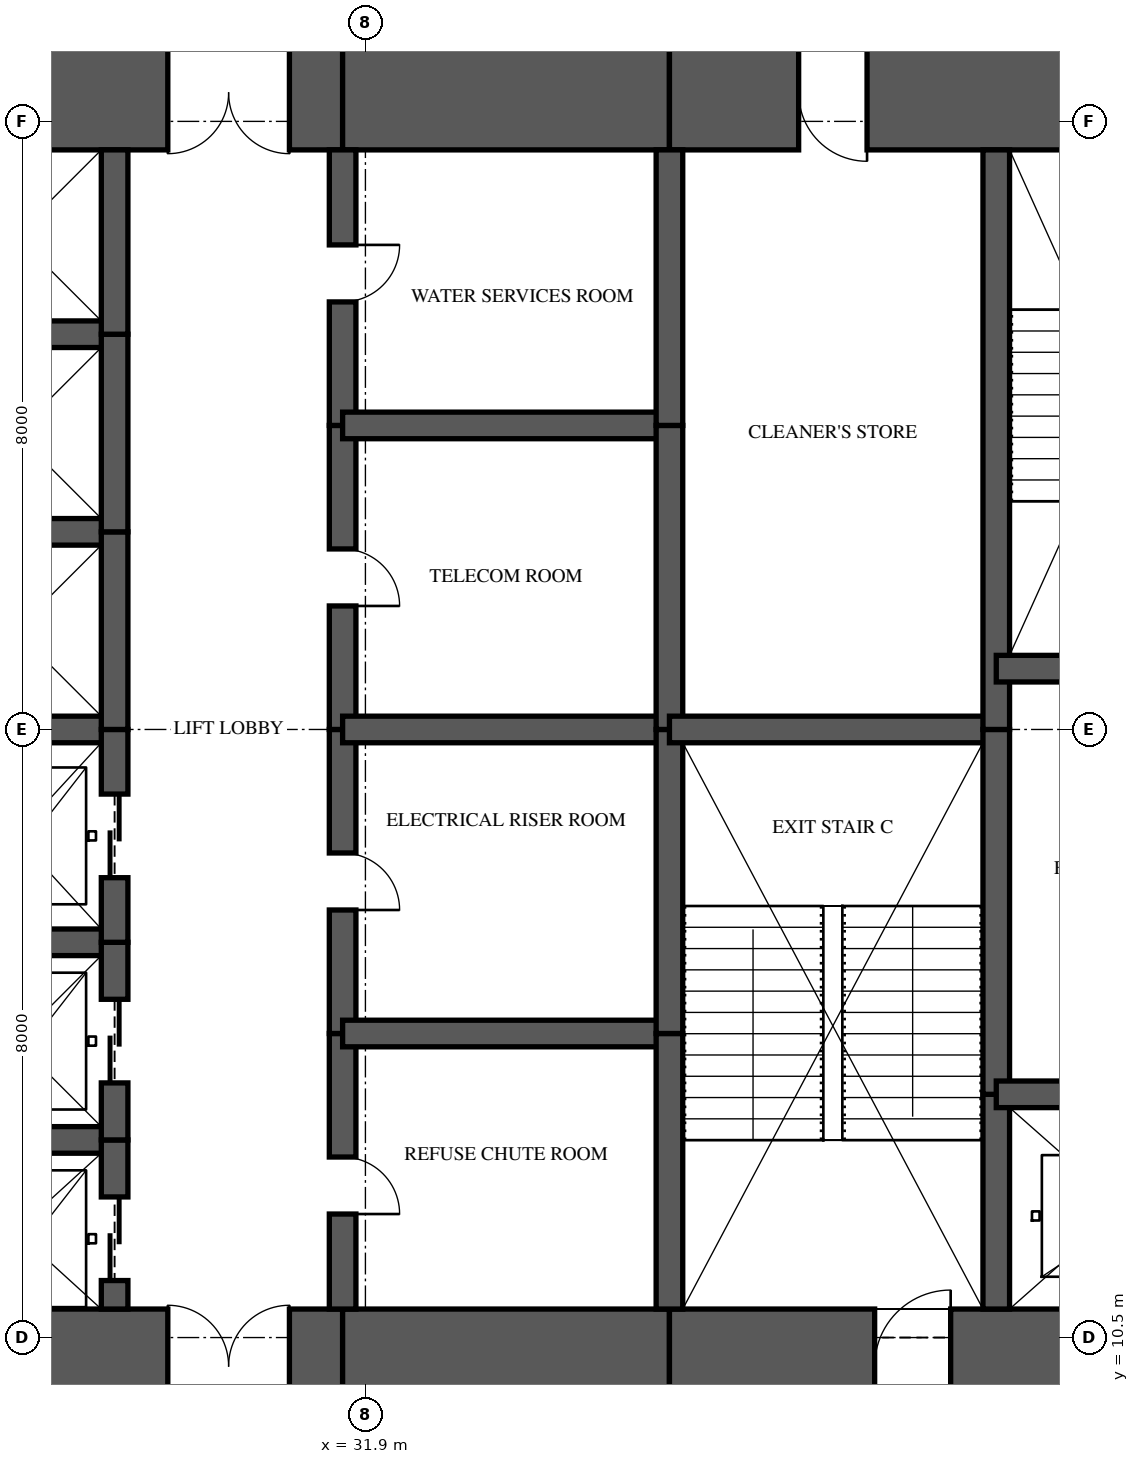
"""IFC4 building model, lengths in metres.
Left out: names, types, materials, properties, quantities, classifications, styles, units other than length and angle.
Written with IfcOpenShell. Run it as: python <this file> out.ifc"""

import sys

from ifc_helpers import new_model, si_unit, direction, frame, frame_2d, origin, place, context, subcontext, project, spatial, rectangle, extrude, element, fill, save


model = new_model("IFC4")
c1 = context("Model", 3, precision=1e-05, world=origin(), true_north=direction((0.0, 1.0)))
c2 = subcontext(c1, "Body", "Model", "MODEL_VIEW")
j1 = project(units=[si_unit("LENGTHUNIT", "METRE"), si_unit("PLANEANGLEUNIT", "RADIAN")], contexts=[c1])
p1 = place(None, origin())
s1 = spatial("IfcSite", under=j1, at=p1, CompositionType="ELEMENT")
p2 = place(p1, origin())
s2 = spatial("IfcBuilding", under=s1, at=p2, CompositionType="ELEMENT")
p3 = place(p2, frame((0.0, 0.0, 84.75)))
s3 = spatial("IfcBuildingStorey", under=s2, at=p3, CompositionType="ELEMENT", Elevation=84.75)
p4 = place(p3, frame((26.0, 10.125, 0.0), z_axis=(0.0, 0.0, 1.0), x_axis=(1.0, 0.0, 0.0)))
e1 = element("IfcWall", 1, at=p4, inside=s3, PredefinedType="SHEAR", context=c2, shape_type="SweptSolid", body=[
    extrude(rectangle(XDim=5.6, YDim=1.5, at=frame_2d((2.8, 0.0))), origin(), (0.0, 0.0, 1.0), 3.35),
])
p5 = place(p4, frame((3.3, 0.0, 0.0)))
e2 = element("IfcOpeningElement", 2, at=p5, cuts=e1, PredefinedType="OPENING", context=c2, shape_type="SweptSolid", body=[
    extrude(rectangle(XDim=1.6, YDim=2.1, at=frame_2d((0.8, 1.05))), frame((0.0, 0.76, 0.0), z_axis=(0.0, -1.0, 0.0), x_axis=(1.0, 0.0, 0.0)), (0.0, 0.0, 1.0), 1.52),
])
p6 = place(p3, frame((31.6, 10.125, 0.0), z_axis=(0.0, 0.0, 1.0), x_axis=(1.0, 0.0, 0.0)))
e3 = element("IfcWall", 3, at=p6, inside=s3, PredefinedType="SHEAR", context=c2, shape_type="SweptSolid", body=[
    extrude(rectangle(XDim=4.3, YDim=1.5, at=frame_2d((2.15, 0.0))), origin(), (0.0, 0.0, 1.0), 3.35),
])
p7 = place(p3, frame((35.9, 10.125, 0.0), z_axis=(0.0, 0.0, 1.0), x_axis=(1.0, 0.0, 0.0)))
e4 = element("IfcWall", 4, at=p7, inside=s3, PredefinedType="SHEAR", context=c2, shape_type="SweptSolid", body=[
    extrude(rectangle(XDim=8.325, YDim=1.5, at=frame_2d((4.163, 0.0))), origin(), (0.0, 0.0, 1.0), 3.35),
])
p8 = place(p7, frame((2.7, 0.0, 0.0)))
e5 = element("IfcOpeningElement", 5, at=p8, cuts=e4, PredefinedType="OPENING", context=c2, shape_type="SweptSolid", body=[
    extrude(rectangle(XDim=1.0, YDim=2.1, at=frame_2d((0.5, 1.05))), frame((0.0, 0.76, 0.0), z_axis=(0.0, -1.0, 0.0), x_axis=(1.0, 0.0, 0.0)), (0.0, 0.0, 1.0), 1.52),
])
p9 = place(p3, frame((44.225, 26.875, 0.0), z_axis=(0.0, 0.0, 1.0), x_axis=(-1.0, 0.0, 0.0)))
e6 = element("IfcWall", 6, at=p9, inside=s3, PredefinedType="SHEAR", context=c2, shape_type="SweptSolid", body=[
    extrude(rectangle(XDim=8.325, YDim=1.5, at=frame_2d((4.163, 0.0))), origin(), (0.0, 0.0, 1.0), 3.35),
])
p10 = place(p9, frame((5.725, 0.0, 0.0)))
e7 = element("IfcOpeningElement", 7, at=p10, cuts=e6, PredefinedType="OPENING", context=c2, shape_type="SweptSolid", body=[
    extrude(rectangle(XDim=0.9, YDim=2.1, at=frame_2d((0.45, 1.05))), frame((0.0, 0.76, 0.0), z_axis=(0.0, -1.0, 0.0), x_axis=(1.0, 0.0, 0.0)), (0.0, 0.0, 1.0), 1.52),
])
p11 = place(p3, frame((35.9, 26.875, 0.0), z_axis=(0.0, 0.0, 1.0), x_axis=(-1.0, 0.0, 0.0)))
e8 = element("IfcWall", 8, at=p11, inside=s3, PredefinedType="SHEAR", context=c2, shape_type="SweptSolid", body=[
    extrude(rectangle(XDim=4.3, YDim=1.5, at=frame_2d((2.15, 0.0))), origin(), (0.0, 0.0, 1.0), 3.35),
])
p12 = place(p3, frame((31.6, 26.875, 0.0), z_axis=(0.0, 0.0, 1.0), x_axis=(-1.0, 0.0, 0.0)))
e9 = element("IfcWall", 9, at=p12, inside=s3, PredefinedType="SHEAR", context=c2, shape_type="SweptSolid", body=[
    extrude(rectangle(XDim=5.6, YDim=1.5, at=frame_2d((2.8, 0.0))), origin(), (0.0, 0.0, 1.0), 3.35),
])
p13 = place(p12, frame((0.7, 0.0, 0.0)))
e10 = element("IfcOpeningElement", 10, at=p13, cuts=e9, PredefinedType="OPENING", context=c2, shape_type="SweptSolid", body=[
    extrude(rectangle(XDim=1.6, YDim=2.1, at=frame_2d((0.8, 1.05))), frame((0.0, 0.76, 0.0), z_axis=(0.0, -1.0, 0.0), x_axis=(1.0, 0.0, 0.0)), (0.0, 0.0, 1.0), 1.52),
])
p14 = place(p3, frame((28.6, 10.875, 0.0), z_axis=(0.0, 0.0, 1.0), x_axis=(0.0, 1.0, 0.0)))
e11 = element("IfcWall", 11, at=p14, inside=s3, PredefinedType="SHEAR", context=c2, shape_type="SweptSolid", body=[
    extrude(rectangle(XDim=2.225, YDim=0.35, at=frame_2d((1.113, 0.0))), origin(), (0.0, 0.0, 1.0), 3.35),
])
p15 = place(p14, frame((0.375, 0.0, 0.0)))
e12 = element("IfcOpeningElement", 12, at=p15, cuts=e11, PredefinedType="OPENING", context=c2, shape_type="SweptSolid", body=[
    extrude(rectangle(XDim=1.1, YDim=2.1, at=frame_2d((0.55, 1.05))), frame((0.0, 0.185, 0.0), z_axis=(0.0, -1.0, 0.0), x_axis=(1.0, 0.0, 0.0)), (0.0, 0.0, 1.0), 0.37),
])
p16 = place(p3, frame((28.6, 13.1, 0.0), z_axis=(0.0, 0.0, 1.0), x_axis=(0.0, 1.0, 0.0)))
e13 = element("IfcWall", 13, at=p16, inside=s3, PredefinedType="SHEAR", context=c2, shape_type="SweptSolid", body=[
    extrude(rectangle(XDim=2.6, YDim=0.35, at=frame_2d((1.3, 0.0))), origin(), (0.0, 0.0, 1.0), 3.35),
])
p17 = place(p16, frame((0.75, 0.0, 0.0)))
e14 = element("IfcOpeningElement", 14, at=p17, cuts=e13, PredefinedType="OPENING", context=c2, shape_type="SweptSolid", body=[
    extrude(rectangle(XDim=1.1, YDim=2.1, at=frame_2d((0.55, 1.05))), frame((0.0, 0.185, 0.0), z_axis=(0.0, -1.0, 0.0), x_axis=(1.0, 0.0, 0.0)), (0.0, 0.0, 1.0), 0.37),
])
p18 = place(p3, frame((28.6, 15.7, 0.0), z_axis=(0.0, 0.0, 1.0), x_axis=(0.0, 1.0, 0.0)))
e15 = element("IfcWall", 15, at=p18, inside=s3, PredefinedType="SHEAR", context=c2, shape_type="SweptSolid", body=[
    extrude(rectangle(XDim=2.8, YDim=0.35, at=frame_2d((1.4, 0.0))), origin(), (0.0, 0.0, 1.0), 3.35),
])
p19 = place(p18, frame((0.85, 0.0, 0.0)))
e16 = element("IfcOpeningElement", 16, at=p19, cuts=e15, PredefinedType="OPENING", context=c2, shape_type="SweptSolid", body=[
    extrude(rectangle(XDim=1.1, YDim=2.1, at=frame_2d((0.55, 1.05))), frame((0.0, 0.185, 0.0), z_axis=(0.0, -1.0, 0.0), x_axis=(1.0, 0.0, 0.0)), (0.0, 0.0, 1.0), 0.37),
])
p20 = place(p3, frame((28.6, 18.5, 0.0), z_axis=(0.0, 0.0, 1.0), x_axis=(0.0, 1.0, 0.0)))
e17 = element("IfcWall", 17, at=p20, inside=s3, PredefinedType="SHEAR", context=c2, shape_type="SweptSolid", body=[
    extrude(rectangle(XDim=2.6, YDim=0.35, at=frame_2d((1.3, 0.0))), origin(), (0.0, 0.0, 1.0), 3.35),
])
p21 = place(p3, frame((28.6, 21.1, 0.0), z_axis=(0.0, 0.0, 1.0), x_axis=(0.0, 1.0, 0.0)))
e18 = element("IfcWall", 18, at=p21, inside=s3, PredefinedType="SHEAR", context=c2, shape_type="SweptSolid", body=[
    extrude(rectangle(XDim=2.6, YDim=0.35, at=frame_2d((1.3, 0.0))), origin(), (0.0, 0.0, 1.0), 3.35),
])
p22 = place(p3, frame((28.6, 23.7, 0.0), z_axis=(0.0, 0.0, 1.0), x_axis=(0.0, 1.0, 0.0)))
e19 = element("IfcWall", 19, at=p22, inside=s3, PredefinedType="SHEAR", context=c2, shape_type="SweptSolid", body=[
    extrude(rectangle(XDim=2.425, YDim=0.35, at=frame_2d((1.212, 0.0))), origin(), (0.0, 0.0, 1.0), 3.35),
])
p23 = place(p3, frame((31.6, 10.875, 0.0), z_axis=(0.0, 0.0, 1.0), x_axis=(0.0, 1.0, 0.0)))
e20 = element("IfcWall", 20, at=p23, inside=s3, PredefinedType="SHEAR", context=c2, shape_type="SweptSolid", body=[
    extrude(rectangle(XDim=3.625, YDim=0.35, at=frame_2d((1.812, 0.0))), origin(), (0.0, 0.0, 1.0), 3.35),
])
p24 = place(p23, frame((1.25, 0.0, 0.0)))
e21 = element("IfcOpeningElement", 21, at=p24, cuts=e20, PredefinedType="OPENING", context=c2, shape_type="SweptSolid", body=[
    extrude(rectangle(XDim=0.75, YDim=2.1, at=frame_2d((0.375, 1.05))), frame((0.0, 0.185, 0.0), z_axis=(0.0, -1.0, 0.0), x_axis=(1.0, 0.0, 0.0)), (0.0, 0.0, 1.0), 0.37),
])
p25 = place(p3, frame((31.6, 14.5, 0.0), z_axis=(0.0, 0.0, 1.0), x_axis=(0.0, 1.0, 0.0)))
e22 = element("IfcWall", 22, at=p25, inside=s3, PredefinedType="SHEAR", context=c2, shape_type="SweptSolid", body=[
    extrude(rectangle(XDim=4.0, YDim=0.35, at=frame_2d((2.0, 0.0))), origin(), (0.0, 0.0, 1.0), 3.35),
])
p26 = place(p25, frame((1.625, 0.0, 0.0)))
e23 = element("IfcOpeningElement", 23, at=p26, cuts=e22, PredefinedType="OPENING", context=c2, shape_type="SweptSolid", body=[
    extrude(rectangle(XDim=0.75, YDim=2.1, at=frame_2d((0.375, 1.05))), frame((0.0, 0.185, 0.0), z_axis=(0.0, -1.0, 0.0), x_axis=(1.0, 0.0, 0.0)), (0.0, 0.0, 1.0), 0.37),
])
p27 = place(p3, frame((31.6, 18.5, 0.0), z_axis=(0.0, 0.0, 1.0), x_axis=(0.0, 1.0, 0.0)))
e24 = element("IfcWall", 24, at=p27, inside=s3, PredefinedType="SHEAR", context=c2, shape_type="SweptSolid", body=[
    extrude(rectangle(XDim=4.0, YDim=0.35, at=frame_2d((2.0, 0.0))), origin(), (0.0, 0.0, 1.0), 3.35),
])
p28 = place(p27, frame((1.625, 0.0, 0.0)))
e25 = element("IfcOpeningElement", 25, at=p28, cuts=e24, PredefinedType="OPENING", context=c2, shape_type="SweptSolid", body=[
    extrude(rectangle(XDim=0.75, YDim=2.1, at=frame_2d((0.375, 1.05))), frame((0.0, 0.185, 0.0), z_axis=(0.0, -1.0, 0.0), x_axis=(1.0, 0.0, 0.0)), (0.0, 0.0, 1.0), 0.37),
])
p29 = place(p3, frame((31.6, 22.5, 0.0), z_axis=(0.0, 0.0, 1.0), x_axis=(0.0, 1.0, 0.0)))
e26 = element("IfcWall", 26, at=p29, inside=s3, PredefinedType="SHEAR", context=c2, shape_type="SweptSolid", body=[
    extrude(rectangle(XDim=3.625, YDim=0.35, at=frame_2d((1.812, 0.0))), origin(), (0.0, 0.0, 1.0), 3.35),
])
p30 = place(p29, frame((1.625, 0.0, 0.0)))
e27 = element("IfcOpeningElement", 27, at=p30, cuts=e26, PredefinedType="OPENING", context=c2, shape_type="SweptSolid", body=[
    extrude(rectangle(XDim=0.75, YDim=2.1, at=frame_2d((0.375, 1.05))), frame((0.0, 0.185, 0.0), z_axis=(0.0, -1.0, 0.0), x_axis=(1.0, 0.0, 0.0)), (0.0, 0.0, 1.0), 0.37),
])
p31 = place(p3, frame((35.9, 10.875, 0.0), z_axis=(0.0, 0.0, 1.0), x_axis=(0.0, 1.0, 0.0)))
e28 = element("IfcWall", 28, at=p31, inside=s3, PredefinedType="SHEAR", context=c2, shape_type="SweptSolid", body=[
    extrude(rectangle(XDim=3.625, YDim=0.35, at=frame_2d((1.812, 0.0))), origin(), (0.0, 0.0, 1.0), 3.35),
])
for number, where, z_axis, x_axis in (
    (29, (35.9, 14.5, 0.0), (0.0, 0.0, 1.0), (0.0, 1.0, 0.0)),
    (30, (35.9, 18.5, 0.0), (0.0, 0.0, 1.0), (0.0, 1.0, 0.0)),
):
    element("IfcWall", number, at=place(p3, frame(where, z_axis=z_axis, x_axis=x_axis)), inside=s3, PredefinedType="SHEAR", context=c2, shape_type="SweptSolid", body=[
        extrude(rectangle(XDim=4.0, YDim=0.35, at=frame_2d((2.0, 0.0))), origin(), (0.0, 0.0, 1.0), 3.35),
    ])
p32 = place(p3, frame((35.9, 22.5, 0.0), z_axis=(0.0, 0.0, 1.0), x_axis=(0.0, 1.0, 0.0)))
e31 = element("IfcWall", 31, at=p32, inside=s3, PredefinedType="SHEAR", context=c2, shape_type="SweptSolid", body=[
    extrude(rectangle(XDim=3.625, YDim=0.35, at=frame_2d((1.812, 0.0))), origin(), (0.0, 0.0, 1.0), 3.35),
])
p33 = place(p3, frame((40.2, 10.875, 0.0), z_axis=(0.0, 0.0, 1.0), x_axis=(0.0, 1.0, 0.0)))
e32 = element("IfcWall", 32, at=p33, inside=s3, PredefinedType="SHEAR", context=c2, shape_type="SweptSolid", body=[
    extrude(rectangle(XDim=2.825, YDim=0.35, at=frame_2d((1.413, 0.0))), origin(), (0.0, 0.0, 1.0), 3.35),
])
p34 = place(p3, frame((40.2, 13.7, 0.0), z_axis=(0.0, 0.0, 1.0), x_axis=(0.0, 1.0, 0.0)))
e33 = element("IfcWall", 33, at=p34, inside=s3, PredefinedType="SHEAR", context=c2, shape_type="SweptSolid", body=[
    extrude(rectangle(XDim=4.8, YDim=0.35, at=frame_2d((2.4, 0.0))), origin(), (0.0, 0.0, 1.0), 3.35),
])
p35 = place(p3, frame((40.2, 18.5, 0.0), z_axis=(0.0, 0.0, 1.0), x_axis=(0.0, 1.0, 0.0)))
e34 = element("IfcWall", 34, at=p35, inside=s3, PredefinedType="SHEAR", context=c2, shape_type="SweptSolid", body=[
    extrude(rectangle(XDim=7.625, YDim=0.35, at=frame_2d((3.812, 0.0))), origin(), (0.0, 0.0, 1.0), 3.35),
])
for number, where, z_axis, x_axis in (
    (35, (26.0, 13.1, 0.0), (0.0, 0.0, 1.0), (1.0, 0.0, 0.0)),
    (36, (26.0, 15.7, 0.0), (0.0, 0.0, 1.0), (1.0, 0.0, 0.0)),
    (37, (26.0, 18.5, 0.0), (0.0, 0.0, 1.0), (1.0, 0.0, 0.0)),
    (38, (26.0, 21.1, 0.0), (0.0, 0.0, 1.0), (1.0, 0.0, 0.0)),
    (39, (26.0, 23.7, 0.0), (0.0, 0.0, 1.0), (1.0, 0.0, 0.0)),
):
    element("IfcWall", number, at=place(p3, frame(where, z_axis=z_axis, x_axis=x_axis)), inside=s3, PredefinedType="SHEAR", context=c2, shape_type="SweptSolid", body=[
        extrude(rectangle(XDim=2.6, YDim=0.35, at=frame_2d((1.3, 0.0))), origin(), (0.0, 0.0, 1.0), 3.35),
    ])
for number, where, z_axis, x_axis in (
    (40, (31.6, 14.5, 0.0), (0.0, 0.0, 1.0), (1.0, 0.0, 0.0)),
    (41, (31.6, 18.5, 0.0), (0.0, 0.0, 1.0), (1.0, 0.0, 0.0)),
    (42, (31.6, 22.5, 0.0), (0.0, 0.0, 1.0), (1.0, 0.0, 0.0)),
):
    element("IfcWall", number, at=place(p3, frame(where, z_axis=z_axis, x_axis=x_axis)), inside=s3, PredefinedType="SHEAR", context=c2, shape_type="SweptSolid", body=[
        extrude(rectangle(XDim=4.3, YDim=0.35, at=frame_2d((2.15, 0.0))), origin(), (0.0, 0.0, 1.0), 3.35),
    ])
p36 = place(p3, frame((35.9, 18.5, 0.0), z_axis=(0.0, 0.0, 1.0), x_axis=(1.0, 0.0, 0.0)))
e43 = element("IfcWall", 43, at=p36, inside=s3, PredefinedType="SHEAR", context=c2, shape_type="SweptSolid", body=[
    extrude(rectangle(XDim=4.3, YDim=0.35, at=frame_2d((2.15, 0.0))), origin(), (0.0, 0.0, 1.0), 3.35),
])
p37 = place(p3, frame((40.2, 13.7, 0.0), z_axis=(0.0, 0.0, 1.0), x_axis=(1.0, 0.0, 0.0)))
e44 = element("IfcWall", 44, at=p37, inside=s3, PredefinedType="SHEAR", context=c2, shape_type="SweptSolid", body=[
    extrude(rectangle(XDim=3.6, YDim=0.35, at=frame_2d((1.8, 0.0))), origin(), (0.0, 0.0, 1.0), 3.35),
])
p38 = place(p37, frame((1.2, 0.0, 0.0)))
e45 = element("IfcOpeningElement", 45, at=p38, cuts=e44, PredefinedType="OPENING", context=c2, shape_type="SweptSolid", body=[
    extrude(rectangle(XDim=1.2, YDim=2.1, at=frame_2d((0.6, 1.05))), frame((0.0, 0.185, 0.0), z_axis=(0.0, -1.0, 0.0), x_axis=(1.0, 0.0, 0.0)), (0.0, 0.0, 1.0), 0.37),
])
p39 = place(p3, frame((40.2, 19.3, 0.0), z_axis=(0.0, 0.0, 1.0), x_axis=(1.0, 0.0, 0.0)))
e46 = element("IfcWall", 46, at=p39, inside=s3, PredefinedType="SHEAR", context=c2, shape_type="SweptSolid", body=[
    extrude(rectangle(XDim=3.6, YDim=0.35, at=frame_2d((1.8, 0.0))), origin(), (0.0, 0.0, 1.0), 3.35),
])
p40 = place(p39, frame((1.3, 0.0, 0.0)))
e47 = element("IfcOpeningElement", 47, at=p40, cuts=e46, PredefinedType="OPENING", context=c2, shape_type="SweptSolid", body=[
    extrude(rectangle(XDim=1.0, YDim=2.1, at=frame_2d((0.5, 1.05))), frame((0.0, 0.185, 0.0), z_axis=(0.0, -1.0, 0.0), x_axis=(1.0, 0.0, 0.0)), (0.0, 0.0, 1.0), 0.37),
])
p41 = place(p15, origin())
e48 = element("IfcDoor", 48, at=p41, inside=s3, OperationType="SLIDING_TO_LEFT", PredefinedType="DOOR", context=c2, shape_type="SweptSolid", body=[
    extrude(rectangle(XDim=1.1, YDim=2.1, at=frame_2d((0.55, 1.05))), frame((0.0, 0.025, 0.0), z_axis=(0.0, -1.0, 0.0), x_axis=(1.0, 0.0, 0.0)), (0.0, 0.0, 1.0), 0.05),
])
fill(e12, e48)
p42 = place(p17, origin())
e49 = element("IfcDoor", 49, at=p42, inside=s3, OperationType="SLIDING_TO_LEFT", PredefinedType="DOOR", context=c2, shape_type="SweptSolid", body=[
    extrude(rectangle(XDim=1.1, YDim=2.1, at=frame_2d((0.55, 1.05))), frame((0.0, 0.025, 0.0), z_axis=(0.0, -1.0, 0.0), x_axis=(1.0, 0.0, 0.0)), (0.0, 0.0, 1.0), 0.05),
])
fill(e14, e49)
p43 = place(p19, origin())
e50 = element("IfcDoor", 50, at=p43, inside=s3, OperationType="SLIDING_TO_LEFT", PredefinedType="DOOR", context=c2, shape_type="SweptSolid", body=[
    extrude(rectangle(XDim=1.1, YDim=2.1, at=frame_2d((0.55, 1.05))), frame((0.0, 0.025, 0.0), z_axis=(0.0, -1.0, 0.0), x_axis=(1.0, 0.0, 0.0)), (0.0, 0.0, 1.0), 0.05),
])
fill(e16, e50)
p44 = place(p5, origin())
e51 = element("IfcDoor", 51, at=p44, inside=s3, OperationType="DOUBLE_DOOR_SINGLE_SWING", PredefinedType="DOOR", context=c2, shape_type="SweptSolid", body=[
    extrude(rectangle(XDim=1.6, YDim=2.1, at=frame_2d((0.8, 1.05))), frame((0.0, 0.025, 0.0), z_axis=(0.0, -1.0, 0.0), x_axis=(1.0, 0.0, 0.0)), (0.0, 0.0, 1.0), 0.05),
])
fill(e2, e51)
p45 = place(p13, origin())
e52 = element("IfcDoor", 52, at=p45, inside=s3, OperationType="DOUBLE_DOOR_SINGLE_SWING", PredefinedType="DOOR", context=c2, shape_type="SweptSolid", body=[
    extrude(rectangle(XDim=1.6, YDim=2.1, at=frame_2d((0.8, 1.05))), frame((0.0, 0.025, 0.0), z_axis=(0.0, -1.0, 0.0), x_axis=(1.0, 0.0, 0.0)), (0.0, 0.0, 1.0), 0.05),
])
fill(e10, e52)
p46 = place(p24, frame((0.75, 0.0, 0.0), z_axis=(0.0, 0.0, 1.0), x_axis=(-1.0, 0.0, 0.0)))
e53 = element("IfcDoor", 53, at=p46, inside=s3, OperationType="SINGLE_SWING_RIGHT", PredefinedType="DOOR", context=c2, shape_type="SweptSolid", body=[
    extrude(rectangle(XDim=0.75, YDim=2.1, at=frame_2d((0.375, 1.05))), frame((0.0, 0.025, 0.0), z_axis=(0.0, -1.0, 0.0), x_axis=(1.0, 0.0, 0.0)), (0.0, 0.0, 1.0), 0.05),
])
fill(e21, e53)
p47 = place(p26, frame((0.75, 0.0, 0.0), z_axis=(0.0, 0.0, 1.0), x_axis=(-1.0, 0.0, 0.0)))
e54 = element("IfcDoor", 54, at=p47, inside=s3, OperationType="SINGLE_SWING_RIGHT", PredefinedType="DOOR", context=c2, shape_type="SweptSolid", body=[
    extrude(rectangle(XDim=0.75, YDim=2.1, at=frame_2d((0.375, 1.05))), frame((0.0, 0.025, 0.0), z_axis=(0.0, -1.0, 0.0), x_axis=(1.0, 0.0, 0.0)), (0.0, 0.0, 1.0), 0.05),
])
fill(e23, e54)
p48 = place(p28, frame((0.75, 0.0, 0.0), z_axis=(0.0, 0.0, 1.0), x_axis=(-1.0, 0.0, 0.0)))
e55 = element("IfcDoor", 55, at=p48, inside=s3, OperationType="SINGLE_SWING_RIGHT", PredefinedType="DOOR", context=c2, shape_type="SweptSolid", body=[
    extrude(rectangle(XDim=0.75, YDim=2.1, at=frame_2d((0.375, 1.05))), frame((0.0, 0.025, 0.0), z_axis=(0.0, -1.0, 0.0), x_axis=(1.0, 0.0, 0.0)), (0.0, 0.0, 1.0), 0.05),
])
fill(e25, e55)
p49 = place(p30, frame((0.75, 0.0, 0.0), z_axis=(0.0, 0.0, 1.0), x_axis=(-1.0, 0.0, 0.0)))
e56 = element("IfcDoor", 56, at=p49, inside=s3, OperationType="SINGLE_SWING_LEFT", PredefinedType="DOOR", context=c2, shape_type="SweptSolid", body=[
    extrude(rectangle(XDim=0.75, YDim=2.1, at=frame_2d((0.375, 1.05))), frame((0.0, 0.025, 0.0), z_axis=(0.0, -1.0, 0.0), x_axis=(1.0, 0.0, 0.0)), (0.0, 0.0, 1.0), 0.05),
])
fill(e27, e56)
p50 = place(p8, origin())
e57 = element("IfcDoor", 57, at=p50, inside=s3, OperationType="SINGLE_SWING_RIGHT", PredefinedType="DOOR", context=c2, shape_type="SweptSolid", body=[
    extrude(rectangle(XDim=1.0, YDim=2.1, at=frame_2d((0.5, 1.05))), frame((0.0, 0.025, 0.0), z_axis=(0.0, -1.0, 0.0), x_axis=(1.0, 0.0, 0.0)), (0.0, 0.0, 1.0), 0.05),
])
fill(e5, e57)
p51 = place(p10, origin())
e58 = element("IfcDoor", 58, at=p51, inside=s3, OperationType="SINGLE_SWING_LEFT", PredefinedType="DOOR", context=c2, shape_type="SweptSolid", body=[
    extrude(rectangle(XDim=0.9, YDim=2.1, at=frame_2d((0.45, 1.05))), frame((0.0, 0.47, 0.0), z_axis=(0.0, -1.0, 0.0), x_axis=(1.0, 0.0, 0.0)), (0.0, 0.0, 1.0), 0.8),
])
fill(e7, e58)
save(model, sys.argv[1])
